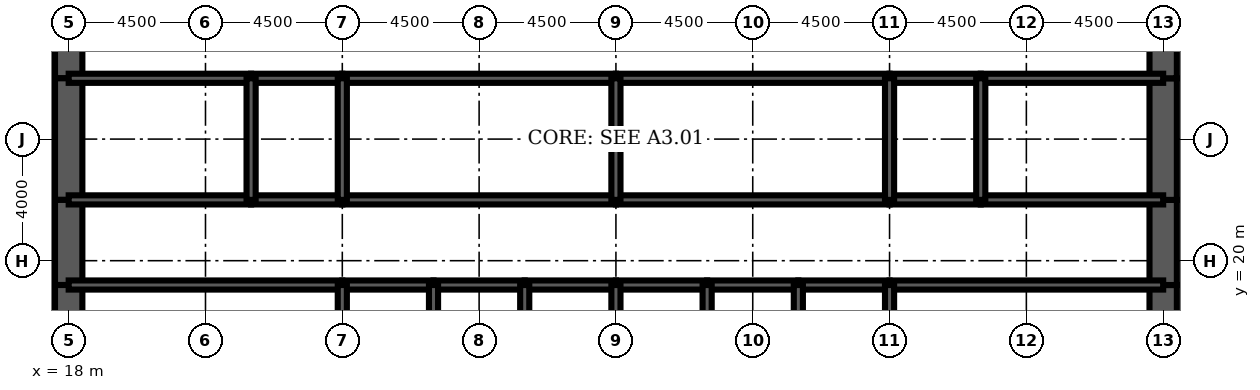
"""IFC4 building model, lengths in metres.
Left out: names, types, materials, properties, quantities, classifications, styles, units other than length and angle.
Written with IfcOpenShell. Run it as: python <this file> out.ifc"""

import sys

from ifc_helpers import new_model, si_unit, direction, frame, frame_2d, origin, place, context, subcontext, project, spatial, rectangle, extrude, element, fill, save


model = new_model("IFC4")
c1 = context("Model", 3, precision=1e-05, world=origin(), true_north=direction((0.0, 1.0)))
c2 = subcontext(c1, "Body", "Model", "MODEL_VIEW")
j1 = project(units=[si_unit("LENGTHUNIT", "METRE"), si_unit("PLANEANGLEUNIT", "RADIAN")], contexts=[c1])
p1 = place(None, origin())
s1 = spatial("IfcSite", under=j1, at=p1, CompositionType="ELEMENT")
p2 = place(p1, origin())
s2 = spatial("IfcBuilding", under=s1, at=p2, CompositionType="ELEMENT")
p3 = place(p2, frame((0.0, 0.0, -6.0)))
s3 = spatial("IfcBuildingStorey", under=s2, at=p3, CompositionType="ELEMENT", Elevation=-6.0)
p4 = place(p3, frame((18.0, 28.8, 0.0), z_axis=(0.0, 0.0, 1.0), x_axis=(0.0, -1.0, 0.0)))
e1 = element("IfcWall", 1, at=p4, inside=s3, PredefinedType="SHEAR", context=c2, shape_type="SweptSolid", body=[
    extrude(rectangle(XDim=2.8, YDim=0.9, at=frame_2d((1.4, 0.0))), origin(), (0.0, 0.0, 1.0), 6.0),
])
p5 = place(p4, frame((0.4, 0.0, 0.0)))
e2 = element("IfcOpeningElement", 2, at=p5, cuts=e1, PredefinedType="OPENING", context=c2, shape_type="SweptSolid", body=[
    extrude(rectangle(XDim=1.8, YDim=2.1, at=frame_2d((0.9, 1.05))), frame((0.0, 0.46, 0.0), z_axis=(0.0, -1.0, 0.0), x_axis=(1.0, 0.0, 0.0)), (0.0, 0.0, 1.0), 0.92),
])
p6 = place(p3, frame((18.0, 26.0, 0.0), z_axis=(0.0, 0.0, 1.0), x_axis=(0.0, -1.0, 0.0)))
e3 = element("IfcWall", 3, at=p6, inside=s3, PredefinedType="SHEAR", context=c2, shape_type="SweptSolid", body=[
    extrude(rectangle(XDim=4.0, YDim=0.9, at=frame_2d((2.0, 0.0))), origin(), (0.0, 0.0, 1.0), 6.0),
])
p7 = place(p3, frame((18.0, 22.0, 0.0), z_axis=(0.0, 0.0, 1.0), x_axis=(0.0, -1.0, 0.0)))
e4 = element("IfcWall", 4, at=p7, inside=s3, PredefinedType="SHEAR", context=c2, shape_type="SweptSolid", body=[
    extrude(rectangle(XDim=2.8, YDim=0.9, at=frame_2d((1.4, 0.0))), origin(), (0.0, 0.0, 1.0), 6.0),
])
p8 = place(p7, frame((0.6, 0.0, 0.0)))
e5 = element("IfcOpeningElement", 5, at=p8, cuts=e4, PredefinedType="OPENING", context=c2, shape_type="SweptSolid", body=[
    extrude(rectangle(XDim=1.8, YDim=2.1, at=frame_2d((0.9, 1.05))), frame((0.0, 0.46, 0.0), z_axis=(0.0, -1.0, 0.0), x_axis=(1.0, 0.0, 0.0)), (0.0, 0.0, 1.0), 0.92),
])
for number, where, z_axis, x_axis in (
    (6, (18.0, 19.2, 0.0), (0.0, 0.0, 1.0), (0.0, -1.0, 0.0)),
    (7, (54.0, 16.0, 0.0), (0.0, 0.0, 1.0), (0.0, 1.0, 0.0)),
):
    element("IfcWall", number, at=place(p3, frame(where, z_axis=z_axis, x_axis=x_axis)), inside=s3, PredefinedType="SHEAR", context=c2, shape_type="SweptSolid", body=[
        extrude(rectangle(XDim=3.2, YDim=0.9, at=frame_2d((1.6, 0.0))), origin(), (0.0, 0.0, 1.0), 6.0),
    ])
p9 = place(p3, frame((54.0, 19.2, 0.0), z_axis=(0.0, 0.0, 1.0), x_axis=(0.0, 1.0, 0.0)))
e8 = element("IfcWall", 8, at=p9, inside=s3, PredefinedType="SHEAR", context=c2, shape_type="SweptSolid", body=[
    extrude(rectangle(XDim=2.8, YDim=0.9, at=frame_2d((1.4, 0.0))), origin(), (0.0, 0.0, 1.0), 6.0),
])
p10 = place(p9, frame((0.4, 0.0, 0.0)))
e9 = element("IfcOpeningElement", 9, at=p10, cuts=e8, PredefinedType="OPENING", context=c2, shape_type="SweptSolid", body=[
    extrude(rectangle(XDim=1.8, YDim=2.1, at=frame_2d((0.9, 1.05))), frame((0.0, 0.46, 0.0), z_axis=(0.0, -1.0, 0.0), x_axis=(1.0, 0.0, 0.0)), (0.0, 0.0, 1.0), 0.92),
])
p11 = place(p3, frame((54.0, 22.0, 0.0), z_axis=(0.0, 0.0, 1.0), x_axis=(0.0, 1.0, 0.0)))
e10 = element("IfcWall", 10, at=p11, inside=s3, PredefinedType="SHEAR", context=c2, shape_type="SweptSolid", body=[
    extrude(rectangle(XDim=4.0, YDim=0.9, at=frame_2d((2.0, 0.0))), origin(), (0.0, 0.0, 1.0), 6.0),
])
p12 = place(p3, frame((54.0, 26.0, 0.0), z_axis=(0.0, 0.0, 1.0), x_axis=(0.0, 1.0, 0.0)))
e11 = element("IfcWall", 11, at=p12, inside=s3, PredefinedType="SHEAR", context=c2, shape_type="SweptSolid", body=[
    extrude(rectangle(XDim=2.8, YDim=0.9, at=frame_2d((1.4, 0.0))), origin(), (0.0, 0.0, 1.0), 6.0),
])
p13 = place(p12, frame((0.6, 0.0, 0.0)))
e12 = element("IfcOpeningElement", 12, at=p13, cuts=e11, PredefinedType="OPENING", context=c2, shape_type="SweptSolid", body=[
    extrude(rectangle(XDim=1.8, YDim=2.1, at=frame_2d((0.9, 1.05))), frame((0.0, 0.46, 0.0), z_axis=(0.0, -1.0, 0.0), x_axis=(1.0, 0.0, 0.0)), (0.0, 0.0, 1.0), 0.92),
])
p14 = place(p3, frame((18.0, 19.2, 0.0), z_axis=(0.0, 0.0, 1.0), x_axis=(1.0, 0.0, 0.0)))
e13 = element("IfcWall", 13, at=p14, inside=s3, PredefinedType="SOLIDWALL", context=c2, shape_type="SweptSolid", body=[
    extrude(rectangle(XDim=9.0, YDim=0.3, at=frame_2d((4.5, 0.0))), origin(), (0.0, 0.0, 1.0), 6.0),
])
p15 = place(p14, frame((0.65, 0.0, 0.0)))
e14 = element("IfcOpeningElement", 14, at=p15, cuts=e13, PredefinedType="OPENING", context=c2, shape_type="SweptSolid", body=[
    extrude(rectangle(XDim=1.0, YDim=2.1, at=frame_2d((0.5, 1.05))), frame((0.0, 0.16, 0.0), z_axis=(0.0, -1.0, 0.0), x_axis=(1.0, 0.0, 0.0)), (0.0, 0.0, 1.0), 0.32),
])
p16 = place(p3, frame((27.0, 19.2, 0.0), z_axis=(0.0, 0.0, 1.0), x_axis=(1.0, 0.0, 0.0)))
e15 = element("IfcWall", 15, at=p16, inside=s3, PredefinedType="SOLIDWALL", context=c2, shape_type="SweptSolid", body=[
    extrude(rectangle(XDim=3.0, YDim=0.3, at=frame_2d((1.5, 0.0))), origin(), (0.0, 0.0, 1.0), 6.0),
])
p17 = place(p16, frame((0.95, 0.0, 0.0)))
e16 = element("IfcOpeningElement", 16, at=p17, cuts=e15, PredefinedType="OPENING", context=c2, shape_type="SweptSolid", body=[
    extrude(rectangle(XDim=1.1, YDim=2.2, at=frame_2d((0.55, 1.1))), frame((0.0, 0.16, 0.0), z_axis=(0.0, -1.0, 0.0), x_axis=(1.0, 0.0, 0.0)), (0.0, 0.0, 1.0), 0.32),
])
for number, where, z_axis, x_axis in (
    (17, (30.0, 19.2, 0.0), (0.0, 0.0, 1.0), (1.0, 0.0, 0.0)),
    (18, (33.0, 19.2, 0.0), (0.0, 0.0, 1.0), (1.0, 0.0, 0.0)),
    (19, (36.0, 19.2, 0.0), (0.0, 0.0, 1.0), (1.0, 0.0, 0.0)),
    (20, (39.0, 19.2, 0.0), (0.0, 0.0, 1.0), (1.0, 0.0, 0.0)),
    (21, (42.0, 19.2, 0.0), (0.0, 0.0, 1.0), (1.0, 0.0, 0.0)),
):
    element("IfcWall", number, at=place(p3, frame(where, z_axis=z_axis, x_axis=x_axis)), inside=s3, PredefinedType="SOLIDWALL", context=c2, shape_type="SweptSolid", body=[
        extrude(rectangle(XDim=3.0, YDim=0.3, at=frame_2d((1.5, 0.0))), origin(), (0.0, 0.0, 1.0), 6.0),
    ])
p18 = place(p3, frame((45.0, 19.2, 0.0), z_axis=(0.0, 0.0, 1.0), x_axis=(1.0, 0.0, 0.0)))
e22 = element("IfcWall", 22, at=p18, inside=s3, PredefinedType="SOLIDWALL", context=c2, shape_type="SweptSolid", body=[
    extrude(rectangle(XDim=9.0, YDim=0.3, at=frame_2d((4.5, 0.0))), origin(), (0.0, 0.0, 1.0), 6.0),
])
p19 = place(p18, frame((7.35, 0.0, 0.0)))
e23 = element("IfcOpeningElement", 23, at=p19, cuts=e22, PredefinedType="OPENING", context=c2, shape_type="SweptSolid", body=[
    extrude(rectangle(XDim=1.0, YDim=2.1, at=frame_2d((0.5, 1.05))), frame((0.0, 0.16, 0.0), z_axis=(0.0, -1.0, 0.0), x_axis=(1.0, 0.0, 0.0)), (0.0, 0.0, 1.0), 0.32),
])
p20 = place(p3, frame((18.0, 22.0, 0.0), z_axis=(0.0, 0.0, 1.0), x_axis=(1.0, 0.0, 0.0)))
e24 = element("IfcWall", 24, at=p20, inside=s3, PredefinedType="SOLIDWALL", context=c2, shape_type="SweptSolid", body=[
    extrude(rectangle(XDim=6.0, YDim=0.3, at=frame_2d((3.0, 0.0))), origin(), (0.0, 0.0, 1.0), 6.0),
])
p21 = place(p20, frame((2.0, 0.0, 0.0)))
e25 = element("IfcOpeningElement", 25, at=p21, cuts=e24, PredefinedType="OPENING", context=c2, shape_type="SweptSolid", body=[
    extrude(rectangle(XDim=1.0, YDim=2.1, at=frame_2d((0.5, 1.05))), frame((0.0, 0.16, 0.0), z_axis=(0.0, -1.0, 0.0), x_axis=(1.0, 0.0, 0.0)), (0.0, 0.0, 1.0), 0.32),
])
p22 = place(p3, frame((24.0, 22.0, 0.0), z_axis=(0.0, 0.0, 1.0), x_axis=(1.0, 0.0, 0.0)))
e26 = element("IfcWall", 26, at=p22, inside=s3, PredefinedType="SOLIDWALL", context=c2, shape_type="SweptSolid", body=[
    extrude(rectangle(XDim=3.0, YDim=0.3, at=frame_2d((1.5, 0.0))), origin(), (0.0, 0.0, 1.0), 6.0),
])
p23 = place(p22, frame((1.0, 0.0, 0.0)))
e27 = element("IfcOpeningElement", 27, at=p23, cuts=e26, PredefinedType="OPENING", context=c2, shape_type="SweptSolid", body=[
    extrude(rectangle(XDim=1.0, YDim=2.1, at=frame_2d((0.5, 1.05))), frame((0.0, 0.16, 0.0), z_axis=(0.0, -1.0, 0.0), x_axis=(1.0, 0.0, 0.0)), (0.0, 0.0, 1.0), 0.32),
])
p24 = place(p3, frame((27.0, 22.0, 0.0), z_axis=(0.0, 0.0, 1.0), x_axis=(1.0, 0.0, 0.0)))
e28 = element("IfcWall", 28, at=p24, inside=s3, PredefinedType="SOLIDWALL", context=c2, shape_type="SweptSolid", body=[
    extrude(rectangle(XDim=9.0, YDim=0.3, at=frame_2d((4.5, 0.0))), origin(), (0.0, 0.0, 1.0), 6.0),
])
p25 = place(p24, frame((4.0, 0.0, 0.0)))
e29 = element("IfcOpeningElement", 29, at=p25, cuts=e28, PredefinedType="OPENING", context=c2, shape_type="SweptSolid", body=[
    extrude(rectangle(XDim=1.0, YDim=2.1, at=frame_2d((0.5, 1.05))), frame((0.0, 0.16, 0.0), z_axis=(0.0, -1.0, 0.0), x_axis=(1.0, 0.0, 0.0)), (0.0, 0.0, 1.0), 0.32),
])
p26 = place(p3, frame((36.0, 22.0, 0.0), z_axis=(0.0, 0.0, 1.0), x_axis=(1.0, 0.0, 0.0)))
e30 = element("IfcWall", 30, at=p26, inside=s3, PredefinedType="SOLIDWALL", context=c2, shape_type="SweptSolid", body=[
    extrude(rectangle(XDim=9.0, YDim=0.3, at=frame_2d((4.5, 0.0))), origin(), (0.0, 0.0, 1.0), 6.0),
])
p27 = place(p26, frame((4.0, 0.0, 0.0)))
e31 = element("IfcOpeningElement", 31, at=p27, cuts=e30, PredefinedType="OPENING", context=c2, shape_type="SweptSolid", body=[
    extrude(rectangle(XDim=1.0, YDim=2.1, at=frame_2d((0.5, 1.05))), frame((0.0, 0.16, 0.0), z_axis=(0.0, -1.0, 0.0), x_axis=(1.0, 0.0, 0.0)), (0.0, 0.0, 1.0), 0.32),
])
p28 = place(p3, frame((45.0, 22.0, 0.0), z_axis=(0.0, 0.0, 1.0), x_axis=(1.0, 0.0, 0.0)))
e32 = element("IfcWall", 32, at=p28, inside=s3, PredefinedType="SOLIDWALL", context=c2, shape_type="SweptSolid", body=[
    extrude(rectangle(XDim=3.0, YDim=0.3, at=frame_2d((1.5, 0.0))), origin(), (0.0, 0.0, 1.0), 6.0),
])
p29 = place(p28, frame((1.0, 0.0, 0.0)))
e33 = element("IfcOpeningElement", 33, at=p29, cuts=e32, PredefinedType="OPENING", context=c2, shape_type="SweptSolid", body=[
    extrude(rectangle(XDim=1.0, YDim=2.1, at=frame_2d((0.5, 1.05))), frame((0.0, 0.16, 0.0), z_axis=(0.0, -1.0, 0.0), x_axis=(1.0, 0.0, 0.0)), (0.0, 0.0, 1.0), 0.32),
])
p30 = place(p3, frame((48.0, 22.0, 0.0), z_axis=(0.0, 0.0, 1.0), x_axis=(1.0, 0.0, 0.0)))
e34 = element("IfcWall", 34, at=p30, inside=s3, PredefinedType="SOLIDWALL", context=c2, shape_type="SweptSolid", body=[
    extrude(rectangle(XDim=6.0, YDim=0.3, at=frame_2d((3.0, 0.0))), origin(), (0.0, 0.0, 1.0), 6.0),
])
p31 = place(p30, frame((2.0, 0.0, 0.0)))
e35 = element("IfcOpeningElement", 35, at=p31, cuts=e34, PredefinedType="OPENING", context=c2, shape_type="SweptSolid", body=[
    extrude(rectangle(XDim=1.0, YDim=2.1, at=frame_2d((0.5, 1.05))), frame((0.0, 0.16, 0.0), z_axis=(0.0, -1.0, 0.0), x_axis=(1.0, 0.0, 0.0)), (0.0, 0.0, 1.0), 0.32),
])
p32 = place(p30, frame((4.3, 0.0, 0.0)))
e36 = element("IfcOpeningElement", 36, at=p32, cuts=e34, PredefinedType="OPENING", context=c2, shape_type="SweptSolid", body=[
    extrude(rectangle(XDim=1.0, YDim=2.1, at=frame_2d((0.5, 1.05))), frame((0.0, 0.16, 0.0), z_axis=(0.0, -1.0, 0.0), x_axis=(1.0, 0.0, 0.0)), (0.0, 0.0, 1.0), 0.32),
])
p33 = place(p3, frame((18.0, 26.0, 0.0), z_axis=(0.0, 0.0, 1.0), x_axis=(1.0, 0.0, 0.0)))
e37 = element("IfcWall", 37, at=p33, inside=s3, PredefinedType="SOLIDWALL", context=c2, shape_type="SweptSolid", body=[
    extrude(rectangle(XDim=6.0, YDim=0.3, at=frame_2d((3.0, 0.0))), origin(), (0.0, 0.0, 1.0), 6.0),
])
p34 = place(p3, frame((24.0, 26.0, 0.0), z_axis=(0.0, 0.0, 1.0), x_axis=(1.0, 0.0, 0.0)))
e38 = element("IfcWall", 38, at=p34, inside=s3, PredefinedType="SOLIDWALL", context=c2, shape_type="SweptSolid", body=[
    extrude(rectangle(XDim=3.0, YDim=0.3, at=frame_2d((1.5, 0.0))), origin(), (0.0, 0.0, 1.0), 6.0),
])
for number, where, z_axis, x_axis in (
    (39, (27.0, 26.0, 0.0), (0.0, 0.0, 1.0), (1.0, 0.0, 0.0)),
    (40, (36.0, 26.0, 0.0), (0.0, 0.0, 1.0), (1.0, 0.0, 0.0)),
):
    element("IfcWall", number, at=place(p3, frame(where, z_axis=z_axis, x_axis=x_axis)), inside=s3, PredefinedType="SOLIDWALL", context=c2, shape_type="SweptSolid", body=[
        extrude(rectangle(XDim=9.0, YDim=0.3, at=frame_2d((4.5, 0.0))), origin(), (0.0, 0.0, 1.0), 6.0),
    ])
p35 = place(p3, frame((45.0, 26.0, 0.0), z_axis=(0.0, 0.0, 1.0), x_axis=(1.0, 0.0, 0.0)))
e41 = element("IfcWall", 41, at=p35, inside=s3, PredefinedType="SOLIDWALL", context=c2, shape_type="SweptSolid", body=[
    extrude(rectangle(XDim=3.0, YDim=0.3, at=frame_2d((1.5, 0.0))), origin(), (0.0, 0.0, 1.0), 6.0),
])
p36 = place(p3, frame((48.0, 26.0, 0.0), z_axis=(0.0, 0.0, 1.0), x_axis=(1.0, 0.0, 0.0)))
e42 = element("IfcWall", 42, at=p36, inside=s3, PredefinedType="SOLIDWALL", context=c2, shape_type="SweptSolid", body=[
    extrude(rectangle(XDim=6.0, YDim=0.3, at=frame_2d((3.0, 0.0))), origin(), (0.0, 0.0, 1.0), 6.0),
])
for number, where, z_axis, x_axis in (
    (43, (27.0, 16.0, 0.0), (0.0, 0.0, 1.0), (0.0, 1.0, 0.0)),
    (44, (30.0, 16.0, 0.0), (0.0, 0.0, 1.0), (0.0, 1.0, 0.0)),
    (45, (33.0, 16.0, 0.0), (0.0, 0.0, 1.0), (0.0, 1.0, 0.0)),
    (46, (36.0, 16.0, 0.0), (0.0, 0.0, 1.0), (0.0, 1.0, 0.0)),
    (47, (39.0, 16.0, 0.0), (0.0, 0.0, 1.0), (0.0, 1.0, 0.0)),
    (48, (42.0, 16.0, 0.0), (0.0, 0.0, 1.0), (0.0, 1.0, 0.0)),
    (49, (45.0, 16.0, 0.0), (0.0, 0.0, 1.0), (0.0, 1.0, 0.0)),
):
    element("IfcWall", number, at=place(p3, frame(where, z_axis=z_axis, x_axis=x_axis)), inside=s3, PredefinedType="SOLIDWALL", context=c2, shape_type="SweptSolid", body=[
        extrude(rectangle(XDim=3.2, YDim=0.3, at=frame_2d((1.6, 0.0))), origin(), (0.0, 0.0, 1.0), 6.0),
    ])
for number, where, z_axis, x_axis in (
    (50, (24.0, 22.0, 0.0), (0.0, 0.0, 1.0), (0.0, 1.0, 0.0)),
    (51, (27.0, 22.0, 0.0), (0.0, 0.0, 1.0), (0.0, 1.0, 0.0)),
    (52, (36.0, 22.0, 0.0), (0.0, 0.0, 1.0), (0.0, 1.0, 0.0)),
    (53, (45.0, 22.0, 0.0), (0.0, 0.0, 1.0), (0.0, 1.0, 0.0)),
    (54, (48.0, 22.0, 0.0), (0.0, 0.0, 1.0), (0.0, 1.0, 0.0)),
):
    element("IfcWall", number, at=place(p3, frame(where, z_axis=z_axis, x_axis=x_axis)), inside=s3, PredefinedType="SOLIDWALL", context=c2, shape_type="SweptSolid", body=[
        extrude(rectangle(XDim=4.0, YDim=0.3, at=frame_2d((2.0, 0.0))), origin(), (0.0, 0.0, 1.0), 6.0),
    ])
p37 = place(p3, frame((51.975, 22.15, 0.0), z_axis=(0.0, 0.0, 1.0), x_axis=(0.0, 1.0, 0.0)))
e55 = element("IfcWall", 55, at=p37, inside=s3, PredefinedType="PARTITIONING", context=c2, shape_type="SweptSolid", body=[
    extrude(rectangle(XDim=3.7, YDim=0.15, at=frame_2d((1.85, 0.0))), origin(), (0.0, 0.0, 1.0), 3.0),
])
p38 = place(p17, origin())
e56 = element("IfcDoor", 56, at=p38, inside=s3, OperationType="DOUBLE_DOOR_SLIDING", PredefinedType="USERDEFINED", context=c2, shape_type="SweptSolid", body=[
    extrude(rectangle(XDim=1.1, YDim=2.2, at=frame_2d((0.55, 1.1))), frame((0.0, 0.025, 0.0), z_axis=(0.0, -1.0, 0.0), x_axis=(1.0, 0.0, 0.0)), (0.0, 0.0, 1.0), 0.05),
])
fill(e16, e56)
p39 = place(p15, origin())
e57 = element("IfcDoor", 57, at=p39, inside=s3, OperationType="SINGLE_SWING_LEFT", PredefinedType="DOOR", context=c2, shape_type="SweptSolid", body=[
    extrude(rectangle(XDim=1.0, YDim=2.1, at=frame_2d((0.5, 1.05))), frame((0.0, 0.025, 0.0), z_axis=(0.0, -1.0, 0.0), x_axis=(1.0, 0.0, 0.0)), (0.0, 0.0, 1.0), 0.05),
])
fill(e14, e57)
p40 = place(p19, origin())
e58 = element("IfcDoor", 58, at=p40, inside=s3, OperationType="SINGLE_SWING_RIGHT", PredefinedType="DOOR", context=c2, shape_type="SweptSolid", body=[
    extrude(rectangle(XDim=1.0, YDim=2.1, at=frame_2d((0.5, 1.05))), frame((0.0, 0.025, 0.0), z_axis=(0.0, -1.0, 0.0), x_axis=(1.0, 0.0, 0.0)), (0.0, 0.0, 1.0), 0.05),
])
fill(e23, e58)
p41 = place(p8, origin())
e59 = element("IfcDoor", 59, at=p41, inside=s3, OperationType="SINGLE_SWING_LEFT", PredefinedType="DOOR", context=c2, shape_type="SweptSolid", body=[
    extrude(rectangle(XDim=1.8, YDim=2.1, at=frame_2d((0.9, 1.05))), frame((0.0, 0.45, 0.0), z_axis=(0.0, -1.0, 0.0), x_axis=(1.0, 0.0, 0.0)), (0.0, 0.0, 1.0), 0.899),
])
fill(e5, e59)
p42 = place(p5, origin())
e60 = element("IfcDoor", 60, at=p42, inside=s3, OperationType="SINGLE_SWING_LEFT", PredefinedType="DOOR", context=c2, shape_type="SweptSolid", body=[
    extrude(rectangle(XDim=1.8, YDim=2.1, at=frame_2d((0.9, 1.05))), frame((0.0, 0.45, 0.0), z_axis=(0.0, -1.0, 0.0), x_axis=(1.0, 0.0, 0.0)), (0.0, 0.0, 1.0), 0.899),
])
fill(e2, e60)
p43 = place(p10, origin())
e61 = element("IfcDoor", 61, at=p43, inside=s3, OperationType="SINGLE_SWING_LEFT", PredefinedType="DOOR", context=c2, shape_type="SweptSolid", body=[
    extrude(rectangle(XDim=1.8, YDim=2.1, at=frame_2d((0.9, 1.05))), frame((0.0, 0.45, 0.0), z_axis=(0.0, -1.0, 0.0), x_axis=(1.0, 0.0, 0.0)), (0.0, 0.0, 1.0), 0.899),
])
fill(e9, e61)
p44 = place(p13, origin())
e62 = element("IfcDoor", 62, at=p44, inside=s3, OperationType="SINGLE_SWING_LEFT", PredefinedType="DOOR", context=c2, shape_type="SweptSolid", body=[
    extrude(rectangle(XDim=1.8, YDim=2.1, at=frame_2d((0.9, 1.05))), frame((0.0, 0.45, 0.0), z_axis=(0.0, -1.0, 0.0), x_axis=(1.0, 0.0, 0.0)), (0.0, 0.0, 1.0), 0.899),
])
fill(e12, e62)
p45 = place(p21, origin())
e63 = element("IfcDoor", 63, at=p45, inside=s3, OperationType="SINGLE_SWING_LEFT", PredefinedType="DOOR", context=c2, shape_type="SweptSolid", body=[
    extrude(rectangle(XDim=1.0, YDim=2.1, at=frame_2d((0.5, 1.05))), frame((0.0, 0.025, 0.0), z_axis=(0.0, -1.0, 0.0), x_axis=(1.0, 0.0, 0.0)), (0.0, 0.0, 1.0), 0.05),
])
fill(e25, e63)
p46 = place(p23, origin())
e64 = element("IfcDoor", 64, at=p46, inside=s3, OperationType="SINGLE_SWING_LEFT", PredefinedType="DOOR", context=c2, shape_type="SweptSolid", body=[
    extrude(rectangle(XDim=1.0, YDim=2.1, at=frame_2d((0.5, 1.05))), frame((0.0, 0.025, 0.0), z_axis=(0.0, -1.0, 0.0), x_axis=(1.0, 0.0, 0.0)), (0.0, 0.0, 1.0), 0.05),
])
fill(e27, e64)
p47 = place(p25, origin())
e65 = element("IfcDoor", 65, at=p47, inside=s3, OperationType="SINGLE_SWING_LEFT", PredefinedType="DOOR", context=c2, shape_type="SweptSolid", body=[
    extrude(rectangle(XDim=1.0, YDim=2.1, at=frame_2d((0.5, 1.05))), frame((0.0, 0.025, 0.0), z_axis=(0.0, -1.0, 0.0), x_axis=(1.0, 0.0, 0.0)), (0.0, 0.0, 1.0), 0.05),
])
fill(e29, e65)
p48 = place(p27, origin())
e66 = element("IfcDoor", 66, at=p48, inside=s3, OperationType="SINGLE_SWING_LEFT", PredefinedType="DOOR", context=c2, shape_type="SweptSolid", body=[
    extrude(rectangle(XDim=1.0, YDim=2.1, at=frame_2d((0.5, 1.05))), frame((0.0, 0.025, 0.0), z_axis=(0.0, -1.0, 0.0), x_axis=(1.0, 0.0, 0.0)), (0.0, 0.0, 1.0), 0.05),
])
fill(e31, e66)
p49 = place(p29, origin())
e67 = element("IfcDoor", 67, at=p49, inside=s3, OperationType="SINGLE_SWING_LEFT", PredefinedType="DOOR", context=c2, shape_type="SweptSolid", body=[
    extrude(rectangle(XDim=1.0, YDim=2.1, at=frame_2d((0.5, 1.05))), frame((0.0, 0.025, 0.0), z_axis=(0.0, -1.0, 0.0), x_axis=(1.0, 0.0, 0.0)), (0.0, 0.0, 1.0), 0.05),
])
fill(e33, e67)
p50 = place(p31, origin())
e68 = element("IfcDoor", 68, at=p50, inside=s3, OperationType="SINGLE_SWING_LEFT", PredefinedType="DOOR", context=c2, shape_type="SweptSolid", body=[
    extrude(rectangle(XDim=1.0, YDim=2.1, at=frame_2d((0.5, 1.05))), frame((0.0, 0.025, 0.0), z_axis=(0.0, -1.0, 0.0), x_axis=(1.0, 0.0, 0.0)), (0.0, 0.0, 1.0), 0.05),
])
fill(e35, e68)
p51 = place(p32, origin())
e69 = element("IfcDoor", 69, at=p51, inside=s3, OperationType="SINGLE_SWING_RIGHT", PredefinedType="DOOR", context=c2, shape_type="SweptSolid", body=[
    extrude(rectangle(XDim=1.0, YDim=2.1, at=frame_2d((0.5, 1.05))), frame((0.0, 0.025, 0.0), z_axis=(0.0, -1.0, 0.0), x_axis=(1.0, 0.0, 0.0)), (0.0, 0.0, 1.0), 0.05),
])
fill(e36, e69)
save(model, sys.argv[1])
